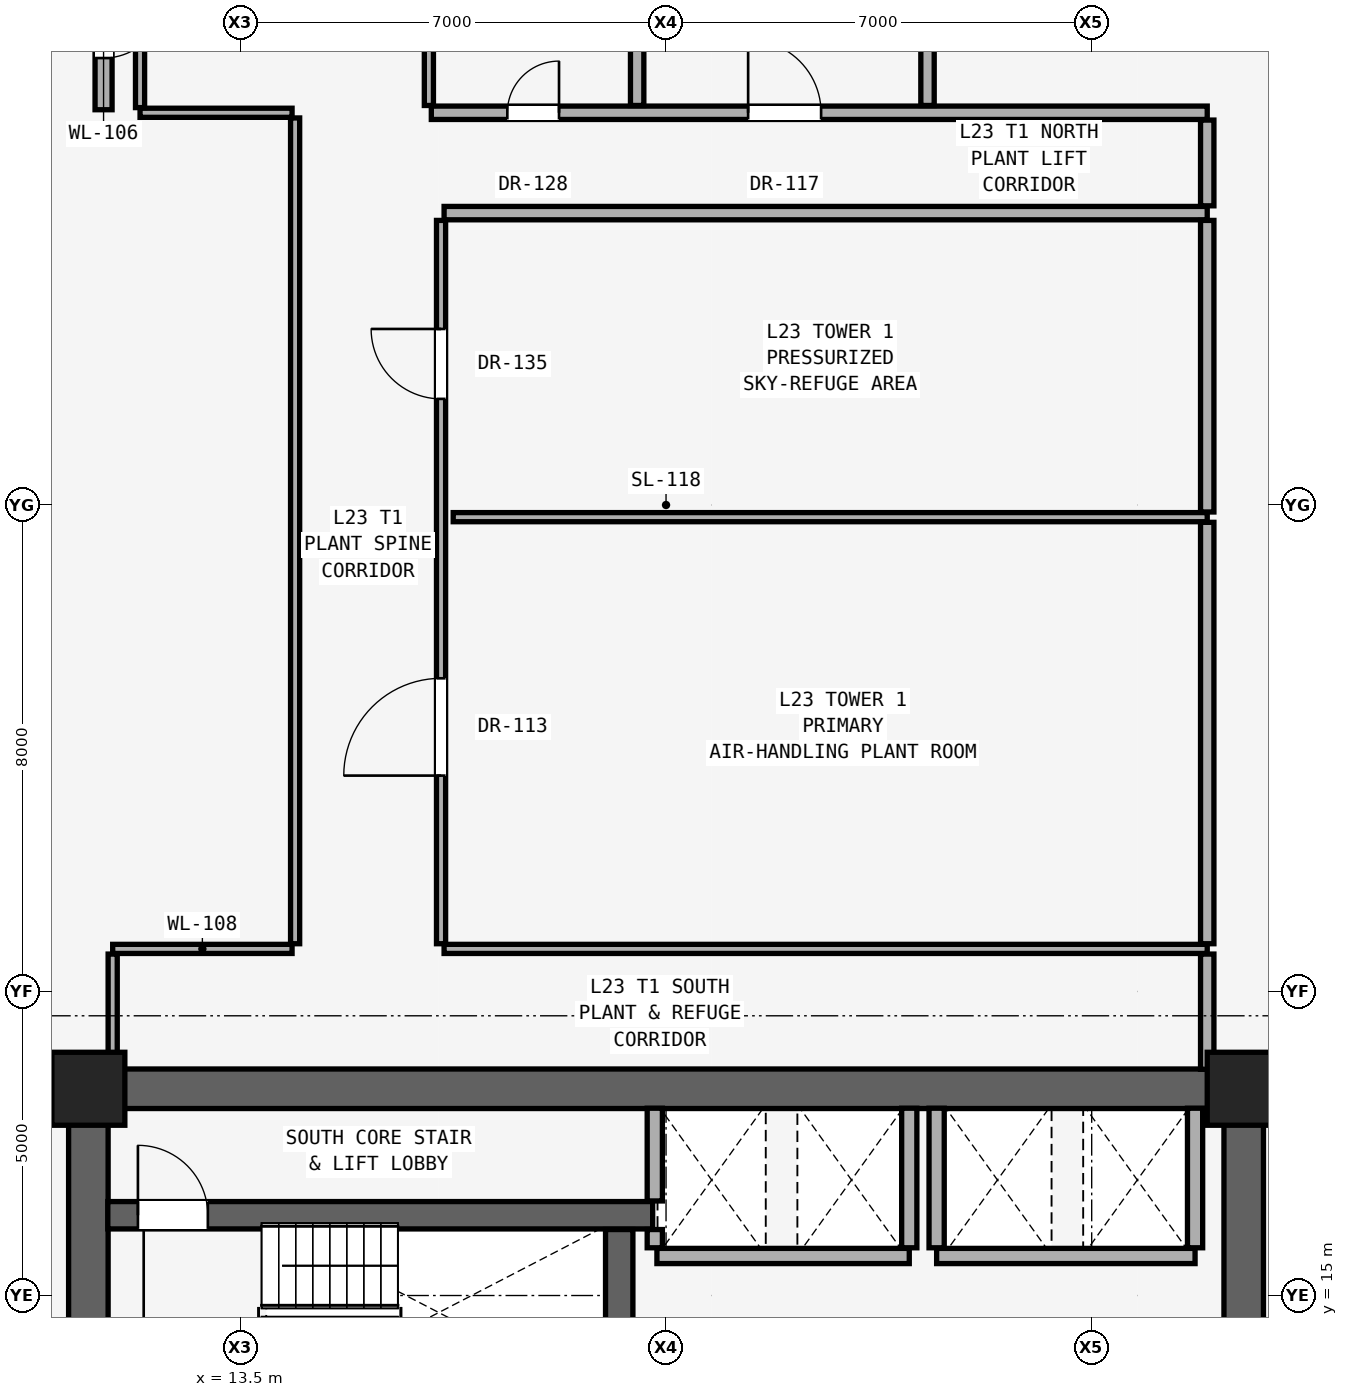
"""IFC4 building model, lengths in metres.
Left out: names, types, materials, properties, quantities, classifications, styles, units other than length and angle.
Written with IfcOpenShell. Run it as: python <this file> out.ifc"""

import sys

from ifc_helpers import new_model, si_unit, direction, frame, frame_2d, origin, origin_2d, place, context, subcontext, project, spatial, rectangle, extrude, element, fill, save


model = new_model("IFC4")
c1 = context("Model", 3, precision=1e-05, world=origin(), true_north=direction((0.0, 1.0)))
c2 = subcontext(c1, "Body", "Model", "MODEL_VIEW")
j1 = project(units=[si_unit("LENGTHUNIT", "METRE"), si_unit("PLANEANGLEUNIT", "RADIAN")], contexts=[c1])
p1 = place(None, origin())
s1 = spatial("IfcSite", under=j1, at=p1, CompositionType="ELEMENT")
p2 = place(p1, origin())
s2 = spatial("IfcBuilding", under=s1, at=p2, CompositionType="ELEMENT")
p3 = place(p2, frame((0.0, 0.0, 81.8)))
s3 = spatial("IfcBuildingStorey", under=s2, at=p3, CompositionType="ELEMENT", Elevation=81.8)
for number, where, z_axis, x_axis in (
    (1, (11.0, 18.4, 0.0), (0.0, 0.0, 1.0), (1.0, 0.0, 0.0)),
    (2, (30.0, 18.4, 0.0), (0.0, 0.0, 1.0), (1.0, 0.0, 0.0)),
):
    element("IfcColumn", number, at=place(p3, frame(where, z_axis=z_axis, x_axis=x_axis)), inside=s3, PredefinedType="COLUMN", context=c2, shape_type="SweptSolid", body=[
        extrude(rectangle(XDim=1.2, YDim=1.2, at=origin_2d()), origin(), (0.0, 0.0, 1.0), 6.6),
    ])
for number, where, z_axis, x_axis in (
    (3, (11.0, 12.4, 0.0), (0.0, 0.0, 1.0), (0.0, 1.0, 0.0)),
    (4, (30.0, 12.4, 0.0), (0.0, 0.0, 1.0), (0.0, 1.0, 0.0)),
):
    element("IfcWall", number, at=place(p3, frame(where, z_axis=z_axis, x_axis=x_axis)), inside=s3, PredefinedType="SHEAR", context=c2, shape_type="SweptSolid", body=[
        extrude(rectangle(XDim=6.0, YDim=0.65, at=frame_2d((3.0, 0.0))), origin(), (0.0, 0.0, 1.0), 6.38),
    ])
p4 = place(p3, frame((11.0, 18.4, 0.0), z_axis=(0.0, 0.0, 1.0), x_axis=(1.0, 0.0, 0.0)))
e5 = element("IfcWall", 5, at=p4, inside=s3, PredefinedType="SHEAR", context=c2, shape_type="SweptSolid", body=[
    extrude(rectangle(XDim=19.0, YDim=0.65, at=frame_2d((9.5, 0.0))), origin(), (0.0, 0.0, 1.0), 6.38),
])
p5 = place(p3, frame((11.25, 37.2, 0.0), z_axis=(0.0, 0.0, 1.0), x_axis=(0.0, -1.0, 0.0)))
e6 = element("IfcWall", 6, at=p5, inside=s3, PredefinedType="SOLIDWALL", context=c2, shape_type="SweptSolid", body=[
    extrude(rectangle(XDim=2.7, YDim=0.28, at=frame_2d((1.35, 0.0))), origin(), (0.0, 0.0, 1.0), 4.93),
])
p6 = place(p5, frame((0.85, 0.0, 0.0)))
e7 = element("IfcOpeningElement", 7, at=p6, cuts=e6, PredefinedType="OPENING", context=c2, shape_type="SweptSolid", body=[
    extrude(rectangle(XDim=1.0, YDim=2.15, at=frame_2d((0.5, 1.075))), frame((0.0, 0.15, 0.0), z_axis=(0.0, -1.0, 0.0), x_axis=(1.0, 0.0, 0.0)), (0.0, 0.0, 1.0), 0.3),
])
p7 = place(p3, frame((20.35, 15.65, 0.0), z_axis=(0.0, 0.0, 1.0), x_axis=(1.0, 0.0, 0.0)))
e8 = element("IfcWall", 8, at=p7, inside=s3, PredefinedType="SOLIDWALL", context=c2, shape_type="SweptSolid", body=[
    extrude(rectangle(XDim=4.15, YDim=0.25, at=frame_2d((2.075, 0.0))), origin(), (0.0, 0.0, 1.0), 6.38),
])
p8 = place(p3, frame((24.95, 15.65, 0.0), z_axis=(0.0, 0.0, 1.0), x_axis=(1.0, 0.0, 0.0)))
e9 = element("IfcWall", 9, at=p8, inside=s3, PredefinedType="SOLIDWALL", context=c2, shape_type="SweptSolid", body=[
    extrude(rectangle(XDim=4.25, YDim=0.25, at=frame_2d((2.125, 0.0))), origin(), (0.0, 0.0, 1.0), 6.38),
])
p9 = place(p3, frame((11.32, 16.32, 0.0), z_axis=(0.0, 0.0, 1.0), x_axis=(1.0, 0.0, 0.0)))
e10 = element("IfcWall", 10, at=p9, inside=s3, PredefinedType="SHEAR", context=c2, shape_type="SweptSolid", body=[
    extrude(rectangle(XDim=8.96, YDim=0.45, at=frame_2d((4.48, 0.0))), origin(), (0.0, 0.0, 1.0), 6.38),
])
p10 = place(p9, frame((0.495, 0.0, 0.0)))
e11 = element("IfcOpeningElement", 11, at=p10, cuts=e10, PredefinedType="OPENING", context=c2, shape_type="SweptSolid", body=[
    extrude(rectangle(XDim=1.15, YDim=2.2, at=frame_2d((0.575, 1.1))), frame((0.0, 0.235, 0.0), z_axis=(0.0, -1.0, 0.0), x_axis=(1.0, 0.0, 0.0)), (0.0, 0.0, 1.0), 0.47),
])
p11 = place(p3, frame((11.4, 20.7, 0.0), z_axis=(0.0, 0.0, 1.0), x_axis=(1.0, 0.0, 0.0)))
e12 = element("IfcWall", 12, at=p11, inside=s3, PredefinedType="PARTITIONING", context=c2, shape_type="SweptSolid", body=[
    extrude(rectangle(XDim=2.95, YDim=0.15, at=frame_2d((1.475, 0.0))), origin(), (0.0, 0.0, 1.0), 6.38),
])
p12 = place(p3, frame((16.85, 20.7, 0.0), z_axis=(0.0, 0.0, 1.0), x_axis=(1.0, 0.0, 0.0)))
e13 = element("IfcWall", 13, at=p12, inside=s3, PredefinedType="PARTITIONING", context=c2, shape_type="SweptSolid", body=[
    extrude(rectangle(XDim=12.55, YDim=0.15, at=frame_2d((6.275, 0.0))), origin(), (0.0, 0.0, 1.0), 5.909),
])
p13 = place(p3, frame((17.0, 27.8, 0.0), z_axis=(0.0, 0.0, 1.0), x_axis=(1.0, 0.0, 0.0)))
e14 = element("IfcWall", 14, at=p13, inside=s3, PredefinedType="PARTITIONING", context=c2, shape_type="SweptSolid", body=[
    extrude(rectangle(XDim=12.4, YDim=0.15, at=frame_2d((6.2, 0.0))), origin(), (0.0, 0.0, 1.0), 5.909),
])
p14 = place(p3, frame((16.85, 32.8, 0.0), z_axis=(0.0, 0.0, 1.0), x_axis=(1.0, 0.0, 0.0)))
e15 = element("IfcWall", 15, at=p14, inside=s3, PredefinedType="SOLIDWALL", context=c2, shape_type="SweptSolid", body=[
    extrude(rectangle(XDim=12.55, YDim=0.22, at=frame_2d((6.275, 0.0))), origin(), (0.0, 0.0, 1.0), 5.909),
])
p15 = place(p3, frame((11.85, 34.45, 0.0), z_axis=(0.0, 0.0, 1.0), x_axis=(1.0, 0.0, 0.0)))
e16 = element("IfcWall", 16, at=p15, inside=s3, PredefinedType="PARTITIONING", context=c2, shape_type="SweptSolid", body=[
    extrude(rectangle(XDim=2.5, YDim=0.15, at=frame_2d((1.25, 0.0))), origin(), (0.0, 0.0, 1.0), 6.38),
])
p16 = place(p3, frame((16.64, 34.45, 0.0), z_axis=(0.0, 0.0, 1.0), x_axis=(1.0, 0.0, 0.0)))
e17 = element("IfcWall", 17, at=p16, inside=s3, PredefinedType="SOLIDWALL", context=c2, shape_type="SweptSolid", body=[
    extrude(rectangle(XDim=12.76, YDim=0.22, at=frame_2d((6.38, 0.0))), origin(), (0.0, 0.0, 1.0), 5.909),
])
p17 = place(p16, frame((5.21, 0.0, 0.0)))
e18 = element("IfcOpeningElement", 18, at=p17, cuts=e17, PredefinedType="OPENING", context=c2, shape_type="SweptSolid", body=[
    extrude(rectangle(XDim=1.2, YDim=2.25, at=frame_2d((0.6, 1.125))), frame((0.0, 0.12, 0.0), z_axis=(0.0, -1.0, 0.0), x_axis=(1.0, 0.0, 0.0)), (0.0, 0.0, 1.0), 0.24),
])
p18 = place(p16, frame((1.25, 0.0, 0.0)))
e19 = element("IfcOpeningElement", 19, at=p18, cuts=e17, PredefinedType="OPENING", context=c2, shape_type="SweptSolid", body=[
    extrude(rectangle(XDim=0.85, YDim=2.01, at=frame_2d((0.425, 1.005))), frame((0.0, 0.12, 0.0), z_axis=(0.0, -1.0, 0.0), x_axis=(1.0, 0.0, 0.0)), (0.0, 0.0, 1.0), 0.24),
])
p19 = place(p3, frame((11.4, 18.72, 0.0), z_axis=(0.0, 0.0, 1.0), x_axis=(0.0, 1.0, 0.0)))
e20 = element("IfcWall", 20, at=p19, inside=s3, PredefinedType="PARTITIONING", context=c2, shape_type="SweptSolid", body=[
    extrude(rectangle(XDim=1.895, YDim=0.15, at=frame_2d((0.948, 0.0))), origin(), (0.0, 0.0, 1.0), 6.38),
])
p20 = place(p3, frame((11.85, 34.535, 0.0), z_axis=(0.0, 0.0, 1.0), x_axis=(0.0, 1.0, 0.0)))
e21 = element("IfcWall", 21, at=p20, inside=s3, PredefinedType="PARTITIONING", context=c2, shape_type="SweptSolid", body=[
    extrude(rectangle(XDim=2.745, YDim=0.15, at=frame_2d((1.373, 0.0))), origin(), (0.0, 0.0, 1.0), 6.38),
])
p21 = place(p3, frame((14.4, 20.785, 0.0), z_axis=(0.0, 0.0, 1.0), x_axis=(0.0, 1.0, 0.0)))
e22 = element("IfcWall", 22, at=p21, inside=s3, PredefinedType="PARTITIONING", context=c2, shape_type="SweptSolid", body=[
    extrude(rectangle(XDim=13.58, YDim=0.15, at=frame_2d((6.79, 0.0))), origin(), (0.0, 0.0, 1.0), 5.424),
])
p22 = place(p3, frame((16.6, 34.57, 0.0), z_axis=(0.0, 0.0, 1.0), x_axis=(0.0, 1.0, 0.0)))
e23 = element("IfcWall", 23, at=p22, inside=s3, PredefinedType="PARTITIONING", context=c2, shape_type="SweptSolid", body=[
    extrude(rectangle(XDim=2.71, YDim=0.15, at=frame_2d((1.355, 0.0))), origin(), (0.0, 0.0, 1.0), 6.38),
])
p23 = place(p3, frame((16.8, 20.785, 0.0), z_axis=(0.0, 0.0, 1.0), x_axis=(0.0, 1.0, 0.0)))
e24 = element("IfcWall", 24, at=p23, inside=s3, PredefinedType="PARTITIONING", context=c2, shape_type="SweptSolid", body=[
    extrude(rectangle(XDim=11.895, YDim=0.15, at=frame_2d((5.948, 0.0))), origin(), (0.0, 0.0, 1.0), 5.424),
])
p24 = place(p23, frame((8.96, 0.0, 0.0)))
e25 = element("IfcOpeningElement", 25, at=p24, cuts=e24, PredefinedType="OPENING", context=c2, shape_type="SweptSolid", body=[
    extrude(rectangle(XDim=1.15, YDim=2.2, at=frame_2d((0.575, 1.1))), frame((0.0, 0.085, 0.0), z_axis=(0.0, -1.0, 0.0), x_axis=(1.0, 0.0, 0.0)), (0.0, 0.0, 1.0), 0.17),
])
p25 = place(p23, frame((2.765, 0.0, 0.0)))
e26 = element("IfcOpeningElement", 26, at=p25, cuts=e24, PredefinedType="OPENING", context=c2, shape_type="SweptSolid", body=[
    extrude(rectangle(XDim=1.6, YDim=2.3, at=frame_2d((0.8, 1.15))), frame((0.0, 0.085, 0.0), z_axis=(0.0, -1.0, 0.0), x_axis=(1.0, 0.0, 0.0)), (0.0, 0.0, 1.0), 0.17),
])
p26 = place(p3, frame((19.73, 13.355, 0.0), z_axis=(0.0, 0.0, 1.0), x_axis=(0.0, 1.0, 0.0)))
e27 = element("IfcWall", 27, at=p26, inside=s3, PredefinedType="SHEAR", context=c2, shape_type="SweptSolid", body=[
    extrude(rectangle(XDim=2.73, YDim=0.45, at=frame_2d((1.365, 0.0))), origin(), (0.0, 0.0, 1.0), 6.38),
])
p27 = place(p3, frame((20.025, 34.57, 0.0), z_axis=(0.0, 0.0, 1.0), x_axis=(0.0, 1.0, 0.0)))
e28 = element("IfcWall", 28, at=p27, inside=s3, PredefinedType="SOLIDWALL", context=c2, shape_type="SweptSolid", body=[
    extrude(rectangle(XDim=2.71, YDim=0.22, at=frame_2d((1.355, 0.0))), origin(), (0.0, 0.0, 1.0), 6.38),
])
p28 = place(p3, frame((20.315, 15.785, 0.0), z_axis=(0.0, 0.0, 1.0), x_axis=(0.0, 1.0, 0.0)))
e29 = element("IfcWall", 29, at=p28, inside=s3, PredefinedType="SOLIDWALL", context=c2, shape_type="SweptSolid", body=[
    extrude(rectangle(XDim=0.3, YDim=0.25, at=frame_2d((0.15, 0.0))), origin(), (0.0, 0.0, 1.0), 6.38),
])
p29 = place(p3, frame((20.315, 16.555, 0.0), z_axis=(0.0, 0.0, 1.0), x_axis=(0.0, 1.0, 0.0)))
e30 = element("IfcWall", 30, at=p29, inside=s3, PredefinedType="SOLIDWALL", context=c2, shape_type="SweptSolid", body=[
    extrude(rectangle(XDim=1.525, YDim=0.25, at=frame_2d((0.763, 0.0))), origin(), (0.0, 0.0, 1.0), 6.38),
])
for number, where, z_axis, x_axis in (
    (31, (24.5, 15.785, 0.0), (0.0, 0.0, 1.0), (0.0, 1.0, 0.0)),
    (32, (24.95, 15.785, 0.0), (0.0, 0.0, 1.0), (0.0, 1.0, 0.0)),
):
    element("IfcWall", number, at=place(p3, frame(where, z_axis=z_axis, x_axis=x_axis)), inside=s3, PredefinedType="SOLIDWALL", context=c2, shape_type="SweptSolid", body=[
        extrude(rectangle(XDim=2.295, YDim=0.25, at=frame_2d((1.147, 0.0))), origin(), (0.0, 0.0, 1.0), 6.38),
    ])
p30 = place(p3, frame((24.8, 34.57, 0.0), z_axis=(0.0, 0.0, 1.0), x_axis=(0.0, 1.0, 0.0)))
e33 = element("IfcWall", 33, at=p30, inside=s3, PredefinedType="SOLIDWALL", context=c2, shape_type="SweptSolid", body=[
    extrude(rectangle(XDim=2.71, YDim=0.22, at=frame_2d((1.355, 0.0))), origin(), (0.0, 0.0, 1.0), 6.38),
])
p31 = place(p3, frame((29.2, 15.785, 0.0), z_axis=(0.0, 0.0, 1.0), x_axis=(0.0, 1.0, 0.0)))
e34 = element("IfcWall", 34, at=p31, inside=s3, PredefinedType="SOLIDWALL", context=c2, shape_type="SweptSolid", body=[
    extrude(rectangle(XDim=2.295, YDim=0.25, at=frame_2d((1.147, 0.0))), origin(), (0.0, 0.0, 1.0), 6.38),
])
p32 = place(p3, frame((29.4, 18.72, 0.0), z_axis=(0.0, 0.0, 1.0), x_axis=(0.0, 1.0, 0.0)))
e35 = element("IfcWall", 35, at=p32, inside=s3, PredefinedType="SOLIDWALL", context=c2, shape_type="SweptSolid", body=[
    extrude(rectangle(XDim=1.895, YDim=0.22, at=frame_2d((0.948, 0.0))), origin(), (0.0, 0.0, 1.0), 6.38),
])
p33 = place(p3, frame((29.4, 20.785, 0.0), z_axis=(0.0, 0.0, 1.0), x_axis=(0.0, 1.0, 0.0)))
e36 = element("IfcWall", 36, at=p33, inside=s3, PredefinedType="SOLIDWALL", context=c2, shape_type="SweptSolid", body=[
    extrude(rectangle(XDim=6.93, YDim=0.22, at=frame_2d((3.465, 0.0))), origin(), (0.0, 0.0, 1.0), 5.424),
])
p34 = place(p3, frame((29.4, 27.885, 0.0), z_axis=(0.0, 0.0, 1.0), x_axis=(0.0, 1.0, 0.0)))
e37 = element("IfcWall", 37, at=p34, inside=s3, PredefinedType="SOLIDWALL", context=c2, shape_type="SweptSolid", body=[
    extrude(rectangle(XDim=4.795, YDim=0.22, at=frame_2d((2.397, 0.0))), origin(), (0.0, 0.0, 1.0), 5.424),
])
p35 = place(p3, frame((29.4, 32.92, 0.0), z_axis=(0.0, 0.0, 1.0), x_axis=(0.0, 1.0, 0.0)))
e38 = element("IfcWall", 38, at=p35, inside=s3, PredefinedType="SOLIDWALL", context=c2, shape_type="SweptSolid", body=[
    extrude(rectangle(XDim=1.41, YDim=0.22, at=frame_2d((0.705, 0.0))), origin(), (0.0, 0.0, 1.0), 6.38),
])
p36 = place(p6, origin())
e39 = element("IfcDoor", 39, at=p36, inside=s3, OperationType="SINGLE_SWING_LEFT", PredefinedType="DOOR", context=c2, shape_type="SweptSolid", body=[
    extrude(rectangle(XDim=1.0, YDim=2.15, at=frame_2d((0.5, 1.075))), frame((0.0, 0.025, 0.0), z_axis=(0.0, -1.0, 0.0), x_axis=(1.0, 0.0, 0.0)), (0.0, 0.0, 1.0), 0.05),
])
fill(e7, e39)
p37 = place(p17, origin())
e40 = element("IfcDoor", 40, at=p37, inside=s3, OperationType="SINGLE_SWING_LEFT", PredefinedType="DOOR", context=c2, shape_type="SweptSolid", body=[
    extrude(rectangle(XDim=1.2, YDim=2.25, at=frame_2d((0.6, 1.125))), frame((0.0, 0.025, 0.0), z_axis=(0.0, -1.0, 0.0), x_axis=(1.0, 0.0, 0.0)), (0.0, 0.0, 1.0), 0.05),
])
fill(e18, e40)
p38 = place(p18, origin())
e41 = element("IfcDoor", 41, at=p38, inside=s3, OperationType="SINGLE_SWING_RIGHT", PredefinedType="DOOR", context=c2, shape_type="SweptSolid", body=[
    extrude(rectangle(XDim=0.85, YDim=2.01, at=frame_2d((0.425, 1.005))), frame((0.0, 0.025, 0.0), z_axis=(0.0, -1.0, 0.0), x_axis=(1.0, 0.0, 0.0)), (0.0, 0.0, 1.0), 0.05),
])
fill(e19, e41)
p39 = place(p10, origin())
e42 = element("IfcDoor", 42, at=p39, inside=s3, OperationType="SINGLE_SWING_LEFT", PredefinedType="DOOR", context=c2, shape_type="SweptSolid", body=[
    extrude(rectangle(XDim=1.15, YDim=2.2, at=frame_2d((0.575, 1.1))), frame((0.0, 0.025, 0.0), z_axis=(0.0, -1.0, 0.0), x_axis=(1.0, 0.0, 0.0)), (0.0, 0.0, 1.0), 0.05),
])
fill(e11, e42)
p40 = place(p24, origin())
e43 = element("IfcDoor", 43, at=p40, inside=s3, OperationType="SINGLE_SWING_RIGHT", PredefinedType="DOOR", context=c2, shape_type="SweptSolid", body=[
    extrude(rectangle(XDim=1.15, YDim=2.2, at=frame_2d((0.575, 1.1))), frame((0.0, 0.025, 0.0), z_axis=(0.0, -1.0, 0.0), x_axis=(1.0, 0.0, 0.0)), (0.0, 0.0, 1.0), 0.05),
])
fill(e25, e43)
p41 = place(p25, origin())
e44 = element("IfcDoor", 44, at=p41, inside=s3, OperationType="SINGLE_SWING_LEFT", PredefinedType="DOOR", context=c2, shape_type="SweptSolid", body=[
    extrude(rectangle(XDim=1.6, YDim=2.3, at=frame_2d((0.8, 1.15))), frame((0.0, 0.025, 0.0), z_axis=(0.0, -1.0, 0.0), x_axis=(1.0, 0.0, 0.0)), (0.0, 0.0, 1.0), 0.05),
])
fill(e26, e44)
save(model, sys.argv[1])
